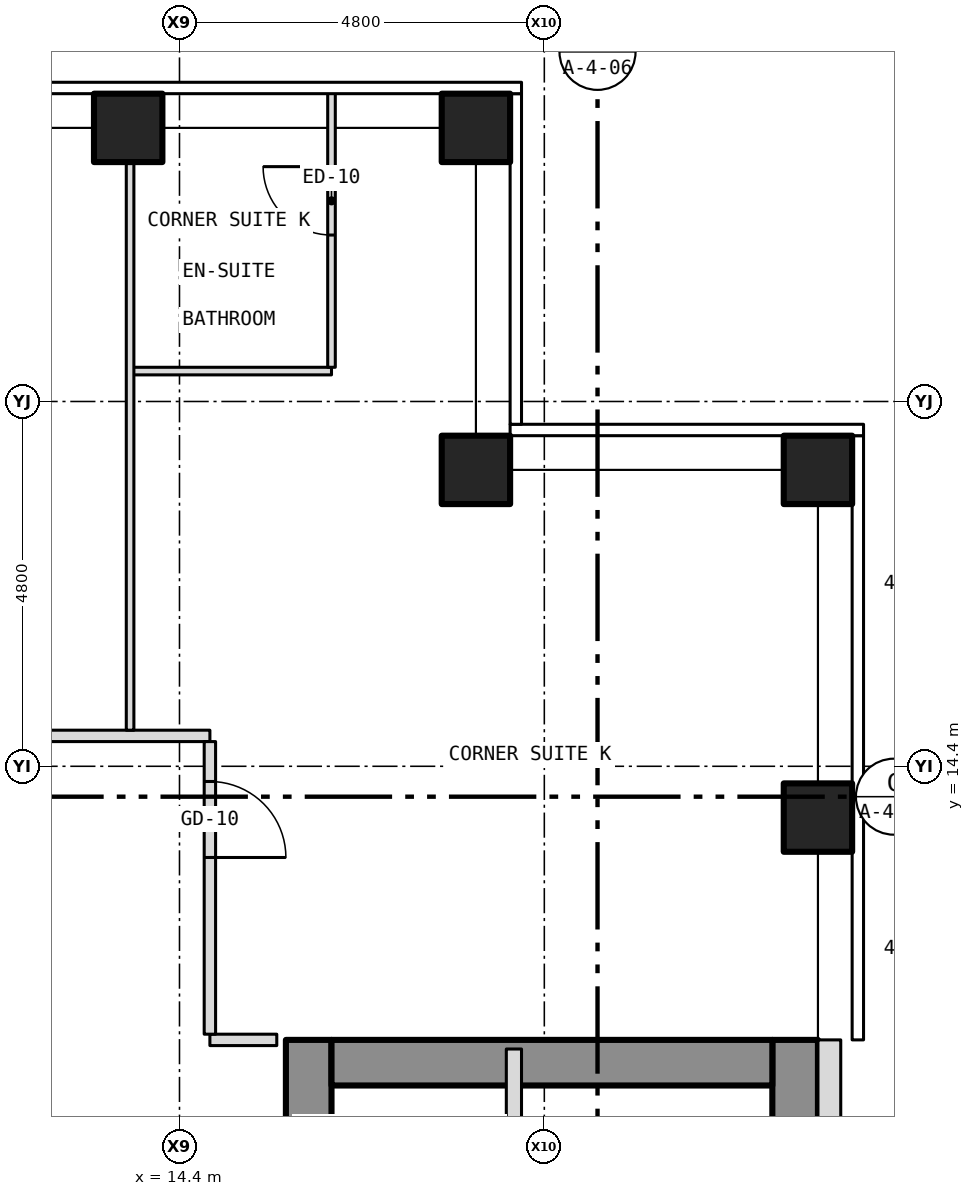
"""IFC4 building model, lengths in metres.
Left out: names, types, materials, properties, quantities, classifications, styles, units other than length and angle.
Written with IfcOpenShell. Run it as: python <this file> out.ifc"""

import sys

from ifc_helpers import new_model, si_unit, direction, frame, frame_2d, origin, origin_2d, place, context, subcontext, project, spatial, rectangle, hollow_rectangle, extrude, element, fill, save


model = new_model("IFC4")
c1 = context("Model", 3, precision=1e-05, world=origin(), true_north=direction((0.0, 1.0)))
c2 = subcontext(c1, "Body", "Model", "MODEL_VIEW")
j1 = project(units=[si_unit("LENGTHUNIT", "METRE"), si_unit("PLANEANGLEUNIT", "RADIAN")], contexts=[c1])
p1 = place(None, origin())
s1 = spatial("IfcSite", under=j1, at=p1, CompositionType="ELEMENT")
p2 = place(p1, origin())
s2 = spatial("IfcBuilding", under=s1, at=p2, CompositionType="ELEMENT")
p3 = place(p2, frame((0.0, 0.0, 99.5)))
s3 = spatial("IfcBuildingStorey", under=s2, at=p3, CompositionType="ELEMENT", Elevation=99.5)
for number, where, z_axis, x_axis in (
    (1, (13.725, 22.8, -0.15), (0.0, 0.0, 1.0), (1.0, 0.0, 0.0)),
    (2, (18.3, 22.8, -0.15), (0.0, 0.0, 1.0), (1.0, 0.0, 0.0)),
    (3, (22.8, 13.725, -0.15), (0.0, 0.0, 1.0), (1.0, 0.0, 0.0)),
    (4, (22.8, 18.3, -0.15), (0.0, 0.0, 1.0), (1.0, 0.0, 0.0)),
    (5, (18.3, 18.3, -0.15), (0.0, 0.0, 1.0), (1.0, 0.0, 0.0)),
):
    element("IfcColumn", number, at=place(p3, frame(where, z_axis=z_axis, x_axis=x_axis)), inside=s3, PredefinedType="COLUMN", context=c2, shape_type="SweptSolid", body=[
        extrude(hollow_rectangle(XDim=0.9, YDim=0.9, WallThickness=0.05, at=origin_2d()), origin(), (0.0, 0.0, 1.0), 3.5),
    ])
p4 = place(p3, frame((16.1, -10.8, 0.0), z_axis=(0.0, 0.0, 1.0), x_axis=(0.0, 1.0, 0.0)))
e6 = element("IfcWall", 6, at=p4, inside=s3, PredefinedType="SHEAR", context=c2, shape_type="SweptSolid", body=[
    extrude(rectangle(XDim=21.6, YDim=0.6, at=frame_2d((10.8, 0.0))), origin(), (0.0, 0.0, 1.0), 3.25),
])
p5 = place(p4, frame((9.4, 0.0, 0.0)))
e7 = element("IfcOpeningElement", 7, at=p5, cuts=e6, PredefinedType="OPENING", context=c2, shape_type="SweptSolid", body=[
    extrude(rectangle(XDim=1.1, YDim=2.1, at=frame_2d((0.55, 1.05))), frame((0.0, 0.312, 0.0), z_axis=(0.0, -1.0, 0.0), x_axis=(1.0, 0.0, 0.0)), (0.0, 0.0, 1.0), 0.624),
])
p6 = place(p4, frame((11.5, 0.0, 0.0)))
e8 = element("IfcOpeningElement", 8, at=p6, cuts=e6, PredefinedType="OPENING", context=c2, shape_type="SweptSolid", body=[
    extrude(rectangle(XDim=1.1, YDim=2.1, at=frame_2d((0.55, 1.05))), frame((0.0, 0.312, 0.0), z_axis=(0.0, -1.0, 0.0), x_axis=(1.0, 0.0, 0.0)), (0.0, 0.0, 1.0), 0.624),
])
p7 = place(p4, frame((13.6, 0.0, 0.0)))
e9 = element("IfcOpeningElement", 9, at=p7, cuts=e6, PredefinedType="OPENING", context=c2, shape_type="SweptSolid", body=[
    extrude(rectangle(XDim=1.1, YDim=2.1, at=frame_2d((0.55, 1.05))), frame((0.0, 0.312, 0.0), z_axis=(0.0, -1.0, 0.0), x_axis=(1.0, 0.0, 0.0)), (0.0, 0.0, 1.0), 0.624),
])
p8 = place(p4, frame((15.7, 0.0, 0.0)))
e10 = element("IfcOpeningElement", 10, at=p8, cuts=e6, PredefinedType="OPENING", context=c2, shape_type="SweptSolid", body=[
    extrude(rectangle(XDim=1.1, YDim=2.1, at=frame_2d((0.55, 1.05))), frame((0.0, 0.312, 0.0), z_axis=(0.0, -1.0, 0.0), x_axis=(1.0, 0.0, 0.0)), (0.0, 0.0, 1.0), 0.624),
])
p9 = place(p4, frame((17.8, 0.0, 0.0)))
e11 = element("IfcOpeningElement", 11, at=p9, cuts=e6, PredefinedType="OPENING", context=c2, shape_type="SweptSolid", body=[
    extrude(rectangle(XDim=1.1, YDim=2.1, at=frame_2d((0.55, 1.05))), frame((0.0, 0.312, 0.0), z_axis=(0.0, -1.0, 0.0), x_axis=(1.0, 0.0, 0.0)), (0.0, 0.0, 1.0), 0.624),
])
p10 = place(p4, frame((5.642, 0.0, 0.0)))
e12 = element("IfcOpeningElement", 12, at=p10, cuts=e6, PredefinedType="OPENING", context=c2, shape_type="SweptSolid", body=[
    extrude(rectangle(XDim=1.1, YDim=2.1, at=frame_2d((0.55, 1.05))), frame((0.0, 0.312, 0.0), z_axis=(0.0, -1.0, 0.0), x_axis=(1.0, 0.0, 0.0)), (0.0, 0.0, 1.0), 0.624),
])
p11 = place(p4, frame((7.5, 0.0, 0.0)))
e13 = element("IfcOpeningElement", 13, at=p11, cuts=e6, PredefinedType="OPENING", context=c2, shape_type="SweptSolid", body=[
    extrude(rectangle(XDim=1.1, YDim=2.1, at=frame_2d((0.55, 1.05))), frame((0.0, 0.312, 0.0), z_axis=(0.0, -1.0, 0.0), x_axis=(1.0, 0.0, 0.0)), (0.0, 0.0, 1.0), 0.624),
])
p12 = place(p3, frame((22.5, -10.8, 0.0), z_axis=(0.0, 0.0, 1.0), x_axis=(0.0, 1.0, 0.0)))
e14 = element("IfcWall", 14, at=p12, inside=s3, PredefinedType="SHEAR", context=c2, shape_type="SweptSolid", body=[
    extrude(rectangle(XDim=21.6, YDim=0.6, at=frame_2d((10.8, 0.0))), origin(), (0.0, 0.0, 1.0), 3.25),
])
p13 = place(p3, frame((16.4, 10.5, 0.0), z_axis=(0.0, 0.0, 1.0), x_axis=(1.0, 0.0, 0.0)))
e15 = element("IfcWall", 15, at=p13, inside=s3, PredefinedType="SHEAR", context=c2, shape_type="SweptSolid", body=[
    extrude(rectangle(XDim=5.8, YDim=0.6, at=frame_2d((2.9, 0.0))), origin(), (0.0, 0.0, 1.0), 3.25),
])
p14 = place(p3, frame((22.95, -10.8, 0.0), z_axis=(0.0, 0.0, 1.0), x_axis=(0.0, 1.0, 0.0)))
e16 = element("IfcWall", 16, at=p14, inside=s3, PredefinedType="SOLIDWALL", context=c2, shape_type="SweptSolid", body=[
    extrude(rectangle(XDim=21.6, YDim=0.3, at=frame_2d((10.8, 0.0))), origin(), (0.0, 0.0, 1.0), 3.5),
])
p15 = place(p14, frame((2.95, 0.0, 1.0)))
e17 = element("IfcOpeningElement", 17, at=p15, cuts=e16, PredefinedType="OPENING", context=c2, shape_type="SweptSolid", body=[
    extrude(rectangle(XDim=0.6, YDim=1.5, at=frame_2d((0.3, 0.75))), frame((0.0, 0.162, 0.0), z_axis=(0.0, -1.0, 0.0), x_axis=(1.0, 0.0, 0.0)), (0.0, 0.0, 1.0), 0.324),
])
p16 = place(p3, frame((14.8, 10.8, 0.0), z_axis=(0.0, 0.0, 1.0), x_axis=(1.0, 0.0, 0.0)))
e18 = element("IfcWall", 18, at=p16, inside=s3, PredefinedType="PARTITIONING", context=c2, shape_type="SweptSolid", body=[
    extrude(rectangle(XDim=0.88, YDim=0.15, at=frame_2d((0.44, 0.0))), origin(), (0.0, 0.0, 1.0), 3.35),
])
p17 = place(p3, frame((-14.8, 14.8, 0.0), z_axis=(0.0, 0.0, 1.0), x_axis=(1.0, 0.0, 0.0)))
e19 = element("IfcWall", 19, at=p17, inside=s3, PredefinedType="PARTITIONING", context=c2, shape_type="SweptSolid", body=[
    extrude(rectangle(XDim=29.6, YDim=0.15, at=frame_2d((14.8, 0.0))), origin(), (0.0, 0.0, 1.0), 3.35),
])
p18 = place(p17, frame((3.963, 0.0, 0.0)))
e20 = element("IfcOpeningElement", 20, at=p18, cuts=e19, PredefinedType="OPENING", context=c2, shape_type="SweptSolid", body=[
    extrude(rectangle(XDim=1.0, YDim=2.1, at=frame_2d((0.5, 1.05))), frame((0.0, 0.087, 0.0), z_axis=(0.0, -1.0, 0.0), x_axis=(1.0, 0.0, 0.0)), (0.0, 0.0, 1.0), 0.174),
])
p19 = place(p17, frame((12.241, 0.0, 0.0)))
e21 = element("IfcOpeningElement", 21, at=p19, cuts=e19, PredefinedType="OPENING", context=c2, shape_type="SweptSolid", body=[
    extrude(rectangle(XDim=1.0, YDim=2.1, at=frame_2d((0.5, 1.05))), frame((0.0, 0.087, 0.0), z_axis=(0.0, -1.0, 0.0), x_axis=(1.0, 0.0, 0.0)), (0.0, 0.0, 1.0), 0.174),
])
p20 = place(p17, frame((21.213, 0.0, 0.0)))
e22 = element("IfcOpeningElement", 22, at=p20, cuts=e19, PredefinedType="OPENING", context=c2, shape_type="SweptSolid", body=[
    extrude(rectangle(XDim=0.9, YDim=2.1, at=frame_2d((0.45, 1.05))), frame((0.0, 0.087, 0.0), z_axis=(0.0, -1.0, 0.0), x_axis=(1.0, 0.0, 0.0)), (0.0, 0.0, 1.0), 0.174),
])
p21 = place(p3, frame((13.75, 19.6, 0.0), z_axis=(0.0, 0.0, 1.0), x_axis=(1.0, 0.0, 0.0)))
e23 = element("IfcWall", 23, at=p21, inside=s3, PredefinedType="PARTITIONING", context=c2, shape_type="SweptSolid", body=[
    extrude(rectangle(XDim=2.65, YDim=0.1, at=frame_2d((1.325, 0.0))), origin(), (0.0, 0.0, 1.0), 3.35),
])
p22 = place(p3, frame((13.75, 14.875, 0.0), z_axis=(0.0, 0.0, 1.0), x_axis=(0.0, 1.0, 0.0)))
e24 = element("IfcWall", 24, at=p22, inside=s3, PredefinedType="PARTITIONING", context=c2, shape_type="SweptSolid", body=[
    extrude(rectangle(XDim=7.805, YDim=0.1, at=frame_2d((3.902, 0.0))), origin(), (0.0, 0.0, 1.0), 3.35),
])
p23 = place(p3, frame((14.8, 10.875, 0.0), z_axis=(0.0, 0.0, 1.0), x_axis=(0.0, 1.0, 0.0)))
e25 = element("IfcWall", 25, at=p23, inside=s3, PredefinedType="PARTITIONING", context=c2, shape_type="SweptSolid", body=[
    extrude(rectangle(XDim=3.85, YDim=0.15, at=frame_2d((1.925, 0.0))), origin(), (0.0, 0.0, 1.0), 3.35),
])
p24 = place(p23, frame((2.325, 0.0, 0.0)))
e26 = element("IfcOpeningElement", 26, at=p24, cuts=e25, PredefinedType="OPENING", context=c2, shape_type="SweptSolid", body=[
    extrude(rectangle(XDim=1.0, YDim=2.1, at=frame_2d((0.5, 1.05))), frame((0.0, 0.087, 0.0), z_axis=(0.0, -1.0, 0.0), x_axis=(1.0, 0.0, 0.0)), (0.0, 0.0, 1.0), 0.174),
])
p25 = place(p3, frame((16.4, 19.65, 0.0), z_axis=(0.0, 0.0, 1.0), x_axis=(0.0, 1.0, 0.0)))
e27 = element("IfcWall", 27, at=p25, inside=s3, PredefinedType="PARTITIONING", context=c2, shape_type="SweptSolid", body=[
    extrude(rectangle(XDim=3.63, YDim=0.1, at=frame_2d((1.815, 0.0))), origin(), (0.0, 0.0, 1.0), 3.35),
])
p26 = place(p25, frame((1.74, 0.0, 0.0)))
e28 = element("IfcOpeningElement", 28, at=p26, cuts=e27, PredefinedType="OPENING", context=c2, shape_type="SweptSolid", body=[
    extrude(rectangle(XDim=0.9, YDim=2.1, at=frame_2d((0.45, 1.05))), frame((0.0, 0.062, 0.0), z_axis=(0.0, -1.0, 0.0), x_axis=(1.0, 0.0, 0.0)), (0.0, 0.0, 1.0), 0.124),
])
p27 = place(p3, frame((18.8, 6.6, 0.0), z_axis=(0.0, 0.0, 1.0), x_axis=(0.0, 1.0, 0.0)))
e29 = element("IfcWall", 29, at=p27, inside=s3, PredefinedType="PARTITIONING", context=c2, shape_type="SweptSolid", body=[
    extrude(rectangle(XDim=4.08, YDim=0.2, at=frame_2d((2.04, 0.0))), origin(), (0.0, 0.0, 1.0), 3.25),
])
p28 = place(p26, origin())
e30 = element("IfcDoor", 30, at=p28, inside=s3, OperationType="SINGLE_SWING_RIGHT", PredefinedType="DOOR", context=c2, shape_type="SweptSolid", body=[
    extrude(rectangle(XDim=0.9, YDim=2.1, at=frame_2d((0.45, 1.05))), frame((0.0, 0.025, 0.0), z_axis=(0.0, -1.0, 0.0), x_axis=(1.0, 0.0, 0.0)), (0.0, 0.0, 1.0), 0.05),
])
fill(e28, e30)
p29 = place(p24, origin())
e31 = element("IfcDoor", 31, at=p29, inside=s3, OperationType="SINGLE_SWING_LEFT", PredefinedType="DOOR", context=c2, shape_type="SweptSolid", body=[
    extrude(rectangle(XDim=1.0, YDim=2.1, at=frame_2d((0.5, 1.05))), frame((0.0, 0.025, 0.0), z_axis=(0.0, -1.0, 0.0), x_axis=(1.0, 0.0, 0.0)), (0.0, 0.0, 1.0), 0.05),
])
fill(e26, e31)
save(model, sys.argv[1])
